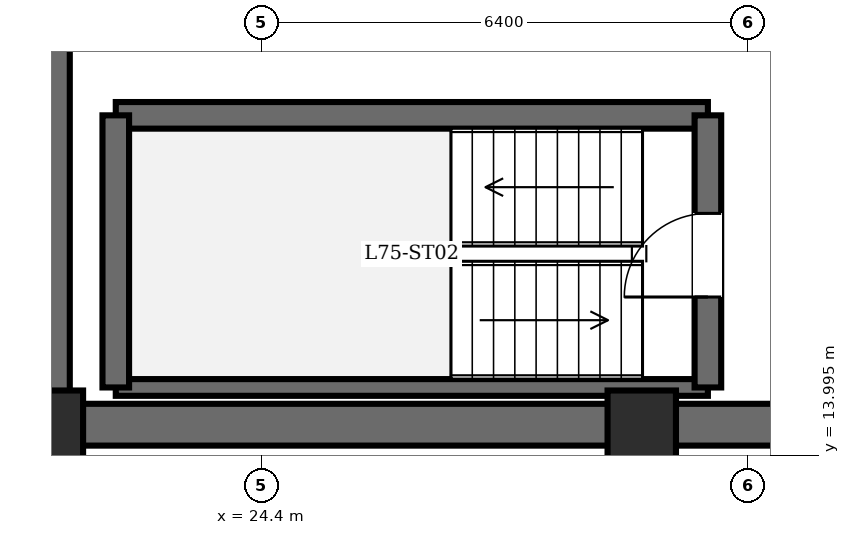
"""IFC4 building model, lengths in metres.
Left out: names, types, materials, properties, quantities, classifications, styles, units other than length and angle.
Written with IfcOpenShell. Run it as: python <this file> out.ifc"""

import sys

from ifc_helpers import new_model, si_unit, direction, frame, frame_2d, origin, origin_2d, place, context, subcontext, project, spatial, rectangle, extrude, element, fill, save


model = new_model("IFC4")
c1 = context("Model", 3, precision=1e-05, world=origin(), true_north=direction((0.0, 1.0)))
c2 = subcontext(c1, "Body", "Model", "MODEL_VIEW")
j1 = project(units=[si_unit("LENGTHUNIT", "METRE"), si_unit("PLANEANGLEUNIT", "RADIAN")], contexts=[c1])
p1 = place(None, origin())
s1 = spatial("IfcSite", under=j1, at=p1, CompositionType="ELEMENT")
p2 = place(p1, origin())
s2 = spatial("IfcBuilding", under=s1, at=p2, CompositionType="ELEMENT")
p3 = place(p2, frame((0.0, 0.0, 288.0)))
s3 = spatial("IfcBuildingStorey", under=s2, at=p3, CompositionType="ELEMENT", Elevation=288.0)
for number, where, z_axis, x_axis in (
    (1, (21.6, 14.4, 0.0), (0.0, 0.0, 1.0), (1.0, 0.0, 0.0)),
    (2, (29.4, 14.4, 0.0), (0.0, 0.0, 1.0), (1.0, 0.0, 0.0)),
):
    element("IfcColumn", number, at=place(p3, frame(where, z_axis=z_axis, x_axis=x_axis)), inside=s3, PredefinedType="COLUMN", context=c2, shape_type="SweptSolid", body=[
        extrude(rectangle(XDim=0.9, YDim=0.9, at=origin_2d()), origin(), (0.0, 0.0, 1.0), 3.65),
    ])
p4 = place(p3, frame((21.6, 14.4, 0.0), z_axis=(0.0, 0.0, 1.0), x_axis=(0.0, 1.0, 0.0)))
e3 = element("IfcWall", 3, at=p4, inside=s3, PredefinedType="SHEAR", context=c2, shape_type="SweptSolid", body=[
    extrude(rectangle(XDim=19.2, YDim=0.55, at=frame_2d((9.6, 0.0))), origin(), (0.0, 0.0, 1.0), 3.45),
])
p5 = place(p3, frame((37.2, 14.4, 0.0), z_axis=(0.0, 0.0, 1.0), x_axis=(-1.0, 0.0, 0.0)))
e4 = element("IfcWall", 4, at=p5, inside=s3, PredefinedType="SHEAR", context=c2, shape_type="SweptSolid", body=[
    extrude(rectangle(XDim=15.6, YDim=0.55, at=frame_2d((7.8, 0.0))), origin(), (0.0, 0.0, 1.0), 3.45),
])
p6 = place(p3, frame((22.48, 18.47, 0.0), z_axis=(0.0, 0.0, 1.0), x_axis=(1.0, 0.0, 0.0)))
e5 = element("IfcWall", 5, at=p6, inside=s3, PredefinedType="SOLIDWALL", context=c2, shape_type="SweptSolid", body=[
    extrude(rectangle(XDim=7.79, YDim=0.35, at=frame_2d((3.895, 0.0))), origin(), (0.0, 0.0, 1.0), 3.45),
])
p7 = place(p3, frame((22.48, 14.89, 0.0), z_axis=(0.0, 0.0, 1.0), x_axis=(1.0, 0.0, 0.0)))
e6 = element("IfcWall", 6, at=p7, inside=s3, PredefinedType="PARTITIONING", context=c2, shape_type="SweptSolid", body=[
    extrude(rectangle(XDim=7.79, YDim=0.22, at=frame_2d((3.895, 0.0))), origin(), (0.0, 0.0, 1.0), 3.45),
])
p8 = place(p3, frame((22.48, 14.89, 0.0), z_axis=(0.0, 0.0, 1.0), x_axis=(0.0, 1.0, 0.0)))
e7 = element("IfcWall", 7, at=p8, inside=s3, PredefinedType="SOLIDWALL", context=c2, shape_type="SweptSolid", body=[
    extrude(rectangle(XDim=3.58, YDim=0.35, at=frame_2d((1.79, 0.0))), origin(), (0.0, 0.0, 1.0), 3.45),
])
p9 = place(p3, frame((30.27, 14.89, 0.0), z_axis=(0.0, 0.0, 1.0), x_axis=(0.0, 1.0, 0.0)))
e8 = element("IfcWall", 8, at=p9, inside=s3, PredefinedType="SOLIDWALL", context=c2, shape_type="SweptSolid", body=[
    extrude(rectangle(XDim=3.58, YDim=0.35, at=frame_2d((1.79, 0.0))), origin(), (0.0, 0.0, 1.0), 3.45),
])
p10 = place(p9, frame((1.19, 0.0, 0.0)))
e9 = element("IfcOpeningElement", 9, at=p10, cuts=e8, PredefinedType="OPENING", context=c2, shape_type="SweptSolid", body=[
    extrude(rectangle(XDim=1.1, YDim=2.15, at=frame_2d((0.55, 1.075))), frame((0.0, 0.185, 0.0), z_axis=(0.0, -1.0, 0.0), x_axis=(1.0, 0.0, 0.0)), (0.0, 0.0, 1.0), 0.37),
])
p11 = place(p10, origin())
e10 = element("IfcDoor", 10, at=p11, inside=s3, OperationType="SINGLE_SWING_LEFT", PredefinedType="DOOR", context=c2, shape_type="SweptSolid", body=[
    extrude(rectangle(XDim=1.1, YDim=2.15, at=frame_2d((0.55, 1.075))), frame((0.0, 0.025, 0.0), z_axis=(0.0, -1.0, 0.0), x_axis=(1.0, 0.0, 0.0)), (0.0, 0.0, 1.0), 0.05),
])
fill(e9, e10)
save(model, sys.argv[1])
